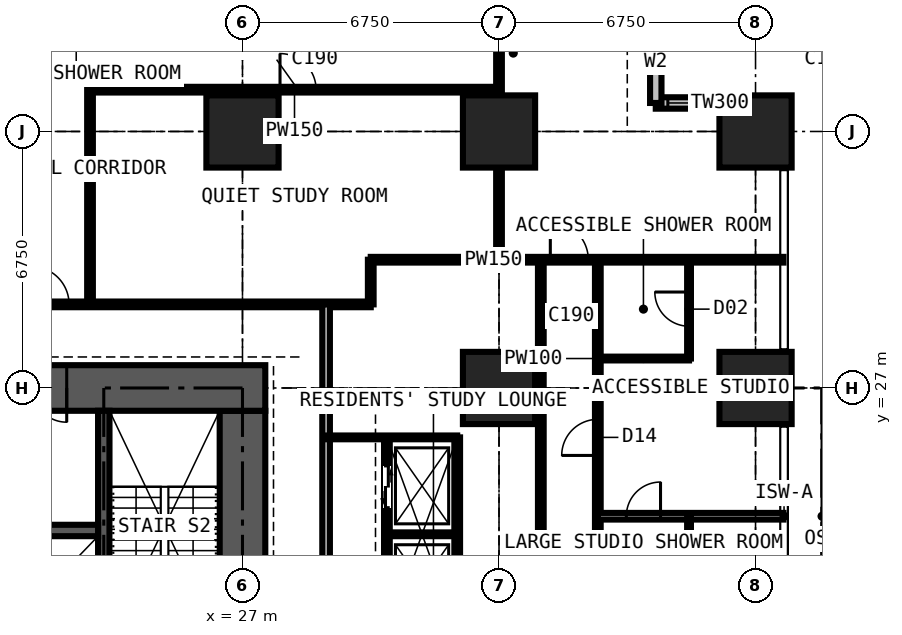
"""IFC4 building model, lengths in metres.
Left out: names, types, materials, properties, quantities, classifications, styles, units other than length and angle.
Written with IfcOpenShell. Run it as: python <this file> out.ifc"""

import sys

from ifc_helpers import new_model, si_unit, direction, frame, frame_2d, origin, origin_2d, place, context, subcontext, project, spatial, rectangle, extrude, element, fill, save


model = new_model("IFC4")
c1 = context("Model", 3, precision=1e-05, world=origin(), true_north=direction((0.0, 1.0)))
c2 = subcontext(c1, "Body", "Model", "MODEL_VIEW")
j1 = project(units=[si_unit("LENGTHUNIT", "METRE"), si_unit("PLANEANGLEUNIT", "RADIAN")], contexts=[c1])
p1 = place(None, origin())
s1 = spatial("IfcSite", under=j1, at=p1, CompositionType="ELEMENT")
p2 = place(p1, origin())
s2 = spatial("IfcBuilding", under=s1, at=p2, CompositionType="ELEMENT")
p3 = place(p2, frame((0.0, 0.0, 18.0)))
s3 = spatial("IfcBuildingStorey", under=s2, at=p3, CompositionType="ELEMENT", Elevation=18.0)
for number, where, z_axis, x_axis in (
    (1, (27.0, 33.75, 0.0), (0.0, 0.0, 1.0), (1.0, 0.0, 0.0)),
    (2, (33.75, 27.0, 0.0), (0.0, 0.0, 1.0), (1.0, 0.0, 0.0)),
    (3, (33.75, 33.75, 0.0), (0.0, 0.0, 1.0), (1.0, 0.0, 0.0)),
    (4, (40.5, 27.0, 0.0), (0.0, 0.0, 1.0), (1.0, 0.0, 0.0)),
    (5, (40.5, 33.75, 0.0), (0.0, 0.0, 1.0), (1.0, 0.0, 0.0)),
):
    element("IfcColumn", number, at=place(p3, frame(where, z_axis=z_axis, x_axis=x_axis)), inside=s3, PredefinedType="COLUMN", context=c2, shape_type="SweptSolid", body=[
        extrude(rectangle(XDim=1.9, YDim=1.9, at=origin_2d()), origin(), (0.0, 0.0, 1.0), 3.6),
    ])
p4 = place(p3, frame((27.0, 14.1, 0.0), z_axis=(0.0, 0.0, 1.0), x_axis=(0.0, 1.0, 0.0)))
e6 = element("IfcWall", 6, at=p4, inside=s3, PredefinedType="SHEAR", context=c2, shape_type="SweptSolid", body=[
    extrude(rectangle(XDim=12.3, YDim=1.2, at=frame_2d((6.15, 0.0))), origin(), (0.0, 0.0, 1.0), 3.6),
])
p5 = place(p4, frame((3.65, 0.0, 0.0)))
e7 = element("IfcOpeningElement", 7, at=p5, cuts=e6, PredefinedType="OPENING", context=c2, shape_type="SweptSolid", body=[
    extrude(rectangle(XDim=1.2, YDim=2.2, at=frame_2d((0.6, 1.1))), frame((0.0, 0.61, 0.0), z_axis=(0.0, -1.0, 0.0), x_axis=(1.0, 0.0, 0.0)), (0.0, 0.0, 1.0), 1.22),
])
p6 = place(p3, frame((27.6, 27.0, 0.0), z_axis=(0.0, 0.0, 1.0), x_axis=(-1.0, 0.0, 0.0)))
e8 = element("IfcWall", 8, at=p6, inside=s3, PredefinedType="SHEAR", context=c2, shape_type="SweptSolid", body=[
    extrude(rectangle(XDim=14.7, YDim=1.2, at=frame_2d((7.35, 0.0))), origin(), (0.0, 0.0, 1.0), 3.6),
])
p7 = place(p6, frame((5.225, 0.0, 0.0)))
e9 = element("IfcOpeningElement", 9, at=p7, cuts=e8, PredefinedType="OPENING", context=c2, shape_type="SweptSolid", body=[
    extrude(rectangle(XDim=0.9, YDim=2.2, at=frame_2d((0.45, 1.1))), frame((0.0, 0.61, 0.0), z_axis=(0.0, -1.0, 0.0), x_axis=(1.0, 0.0, 0.0)), (0.0, 0.0, 1.0), 1.22),
])
p8 = place(p6, frame((8.2, 0.0, 0.0)))
e10 = element("IfcOpeningElement", 10, at=p8, cuts=e8, PredefinedType="OPENING", context=c2, shape_type="SweptSolid", body=[
    extrude(rectangle(XDim=1.0, YDim=2.2, at=frame_2d((0.5, 1.1))), frame((0.0, 0.61, 0.0), z_axis=(0.0, -1.0, 0.0), x_axis=(1.0, 0.0, 0.0)), (0.0, 0.0, 1.0), 1.22),
])
p9 = place(p3, frame((41.25, 34.5, 0.0), z_axis=(0.0, 0.0, 1.0), x_axis=(-1.0, 0.0, 0.0)))
e11 = element("IfcWall", 11, at=p9, inside=s3, PredefinedType="SOLIDWALL", context=c2, shape_type="SweptSolid", body=[
    extrude(rectangle(XDim=3.375, YDim=0.3, at=frame_2d((1.688, 0.0))), origin(), (0.0, 0.0, 1.0), 3.375),
])
p10 = place(p9, frame((1.857, 0.0, 0.9)))
e12 = element("IfcOpeningElement", 12, at=p10, cuts=e11, PredefinedType="OPENING", context=c2, shape_type="SweptSolid", body=[
    extrude(rectangle(XDim=1.2, YDim=1.8, at=frame_2d((0.6, 0.9))), frame((0.0, 0.16, 0.0), z_axis=(0.0, -1.0, 0.0), x_axis=(1.0, 0.0, 0.0)), (0.0, 0.0, 1.0), 0.32),
])
p11 = place(p3, frame((37.875, 34.5, 0.0), z_axis=(0.0, 0.0, 1.0), x_axis=(0.0, 1.0, 0.0)))
e13 = element("IfcWall", 13, at=p11, inside=s3, PredefinedType="SOLIDWALL", context=c2, shape_type="SweptSolid", body=[
    extrude(rectangle(XDim=3.375, YDim=0.3, at=frame_2d((1.688, 0.0))), origin(), (0.0, 0.0, 1.0), 3.375),
])
p12 = place(p11, frame((0.788, 0.0, 0.6)))
e14 = element("IfcOpeningElement", 14, at=p12, cuts=e13, PredefinedType="OPENING", context=c2, shape_type="SweptSolid", body=[
    extrude(rectangle(XDim=1.8, YDim=2.1, at=frame_2d((0.9, 1.05))), frame((0.0, 0.16, 0.0), z_axis=(0.0, -1.0, 0.0), x_axis=(1.0, 0.0, 0.0)), (0.0, 0.0, 1.0), 0.32),
])
p13 = place(p3, frame((23.35, 20.3, 0.0), z_axis=(0.0, 0.0, 1.0), x_axis=(0.0, 1.0, 0.0)))
e15 = element("IfcWall", 15, at=p13, inside=s3, PredefinedType="SHEAR", context=c2, shape_type="SweptSolid", body=[
    extrude(rectangle(XDim=6.1, YDim=0.3, at=frame_2d((3.05, 0.0))), origin(), (0.0, 0.0, 1.0), 3.6),
])
p14 = place(p3, frame((17.3, 23.25, 0.0), z_axis=(0.0, 0.0, 1.0), x_axis=(1.0, 0.0, 0.0)))
e16 = element("IfcWall", 16, at=p14, inside=s3, PredefinedType="SHEAR", context=c2, shape_type="SweptSolid", body=[
    extrude(rectangle(XDim=5.9, YDim=0.3, at=frame_2d((2.95, 0.0))), origin(), (0.0, 0.0, 1.0), 3.6),
])
p15 = place(p3, frame((11.3, 29.2, 0.0), z_axis=(0.0, 0.0, 1.0), x_axis=(1.0, 0.0, 0.0)))
e17 = element("IfcWall", 17, at=p15, inside=s3, PredefinedType="PARTITIONING", context=c2, shape_type="SweptSolid", body=[
    extrude(rectangle(XDim=19.075, YDim=0.15, at=frame_2d((9.538, 0.0))), origin(), (0.0, 0.0, 1.0), 3.375),
])
p16 = place(p15, frame((10.137, 0.0, 0.0)))
e18 = element("IfcOpeningElement", 18, at=p16, cuts=e17, PredefinedType="OPENING", context=c2, shape_type="SweptSolid", body=[
    extrude(rectangle(XDim=1.0, YDim=2.2, at=frame_2d((0.5, 1.1))), frame((0.0, 0.085, 0.0), z_axis=(0.0, -1.0, 0.0), x_axis=(1.0, 0.0, 0.0)), (0.0, 0.0, 1.0), 0.17),
])
p17 = place(p3, frame((22.988, 34.85, 0.0), z_axis=(0.0, 0.0, 1.0), x_axis=(1.0, 0.0, 0.0)))
e19 = element("IfcWall", 19, at=p17, inside=s3, PredefinedType="PARTITIONING", context=c2, shape_type="SweptSolid", body=[
    extrude(rectangle(XDim=10.762, YDim=0.15, at=frame_2d((5.381, 0.0))), origin(), (0.0, 0.0, 1.0), 3.375),
])
p18 = place(p17, frame((5.0, 0.0, 0.0)))
e20 = element("IfcOpeningElement", 20, at=p18, cuts=e19, PredefinedType="OPENING", context=c2, shape_type="SweptSolid", body=[
    extrude(rectangle(XDim=0.95, YDim=2.2, at=frame_2d((0.475, 1.1))), frame((0.0, 0.085, 0.0), z_axis=(0.0, -1.0, 0.0), x_axis=(1.0, 0.0, 0.0)), (0.0, 0.0, 1.0), 0.17),
])
p19 = place(p3, frame((22.988, 29.2, 0.0), z_axis=(0.0, 0.0, 1.0), x_axis=(0.0, 1.0, 0.0)))
e21 = element("IfcWall", 21, at=p19, inside=s3, PredefinedType="PARTITIONING", context=c2, shape_type="SweptSolid", body=[
    extrude(rectangle(XDim=5.65, YDim=0.15, at=frame_2d((2.825, 0.0))), origin(), (0.0, 0.0, 1.0), 3.375),
])
p20 = place(p3, frame((29.2, 11.3, 0.0), z_axis=(0.0, 0.0, 1.0), x_axis=(0.0, 1.0, 0.0)))
e22 = element("IfcWall", 22, at=p20, inside=s3, PredefinedType="PARTITIONING", context=c2, shape_type="SweptSolid", body=[
    extrude(rectangle(XDim=17.9, YDim=0.2, at=frame_2d((8.95, 0.0))), origin(), (0.0, 0.0, 1.0), 3.375),
])
p21 = place(p20, frame((8.35, 0.0, 0.0)))
e23 = element("IfcOpeningElement", 23, at=p21, cuts=e22, PredefinedType="OPENING", context=c2, shape_type="SweptSolid", body=[
    extrude(rectangle(XDim=1.2, YDim=2.2, at=frame_2d((0.6, 1.1))), frame((0.0, 0.11, 0.0), z_axis=(0.0, -1.0, 0.0), x_axis=(1.0, 0.0, 0.0)), (0.0, 0.0, 1.0), 0.22),
])
p22 = place(p3, frame((29.2, 25.7, 0.0), z_axis=(0.0, 0.0, 1.0), x_axis=(1.0, 0.0, 0.0)))
e24 = element("IfcWall", 24, at=p22, inside=s3, PredefinedType="SHEAR", context=c2, shape_type="SweptSolid", body=[
    extrude(rectangle(XDim=3.45, YDim=0.1, at=frame_2d((1.725, 0.0))), origin(), (0.0, 0.0, 1.0), 3.375),
])
p23 = place(p3, frame((30.375, 29.2, 0.0), z_axis=(0.0, 0.0, 1.0), x_axis=(0.0, 1.0, 0.0)))
e25 = element("IfcWall", 25, at=p23, inside=s3, PredefinedType="PARTITIONING", context=c2, shape_type="SweptSolid", body=[
    extrude(rectangle(XDim=1.175, YDim=0.15, at=frame_2d((0.587, 0.0))), origin(), (0.0, 0.0, 1.0), 3.375),
])
p24 = place(p3, frame((30.375, 30.375, 0.0), z_axis=(0.0, 0.0, 1.0), x_axis=(1.0, 0.0, 0.0)))
e26 = element("IfcWall", 26, at=p24, inside=s3, PredefinedType="PARTITIONING", context=c2, shape_type="SweptSolid", body=[
    extrude(rectangle(XDim=10.859, YDim=0.15, at=frame_2d((5.429, 0.0))), origin(), (0.0, 0.0, 1.0), 3.375),
])
p25 = place(p24, frame((4.725, 0.0, 0.0)))
e27 = element("IfcOpeningElement", 27, at=p25, cuts=e26, PredefinedType="OPENING", context=c2, shape_type="SweptSolid", body=[
    extrude(rectangle(XDim=1.0, YDim=2.2, at=frame_2d((0.5, 1.1))), frame((0.0, 0.085, 0.0), z_axis=(0.0, -1.0, 0.0), x_axis=(1.0, 0.0, 0.0)), (0.0, 0.0, 1.0), 0.17),
])
p26 = place(p3, frame((30.8, 14.8, 0.0), z_axis=(0.0, 0.0, 1.0), x_axis=(0.0, 1.0, 0.0)))
e28 = element("IfcWall", 28, at=p26, inside=s3, PredefinedType="PARTITIONING", context=c2, shape_type="SweptSolid", body=[
    extrude(rectangle(XDim=10.9, YDim=0.15, at=frame_2d((5.45, 0.0))), origin(), (0.0, 0.0, 1.0), 3.375),
])
p27 = place(p26, frame((0.75, 0.0, 0.0)))
e29 = element("IfcOpeningElement", 29, at=p27, cuts=e28, PredefinedType="OPENING", context=c2, shape_type="SweptSolid", body=[
    extrude(rectangle(XDim=1.1, YDim=2.2, at=frame_2d((0.55, 1.1))), frame((0.0, 0.085, 0.0), z_axis=(0.0, -1.0, 0.0), x_axis=(1.0, 0.0, 0.0)), (0.0, 0.0, 1.0), 0.17),
])
p28 = place(p26, frame((3.25, 0.0, 0.0)))
e30 = element("IfcOpeningElement", 30, at=p28, cuts=e28, PredefinedType="OPENING", context=c2, shape_type="SweptSolid", body=[
    extrude(rectangle(XDim=1.1, YDim=2.2, at=frame_2d((0.55, 1.1))), frame((0.0, 0.085, 0.0), z_axis=(0.0, -1.0, 0.0), x_axis=(1.0, 0.0, 0.0)), (0.0, 0.0, 1.0), 0.17),
])
p29 = place(p26, frame((6.5, 0.0, 0.0)))
e31 = element("IfcOpeningElement", 31, at=p29, cuts=e28, PredefinedType="OPENING", context=c2, shape_type="SweptSolid", body=[
    extrude(rectangle(XDim=1.1, YDim=2.2, at=frame_2d((0.55, 1.1))), frame((0.0, 0.085, 0.0), z_axis=(0.0, -1.0, 0.0), x_axis=(1.0, 0.0, 0.0)), (0.0, 0.0, 1.0), 0.17),
])
p30 = place(p26, frame((9.05, 0.0, 0.0)))
e32 = element("IfcOpeningElement", 32, at=p30, cuts=e28, PredefinedType="OPENING", context=c2, shape_type="SweptSolid", body=[
    extrude(rectangle(XDim=1.1, YDim=2.2, at=frame_2d((0.55, 1.1))), frame((0.0, 0.085, 0.0), z_axis=(0.0, -1.0, 0.0), x_axis=(1.0, 0.0, 0.0)), (0.0, 0.0, 1.0), 0.17),
])
p31 = place(p3, frame((30.8, 23.15, 0.0), z_axis=(0.0, 0.0, 1.0), x_axis=(1.0, 0.0, 0.0)))
e33 = element("IfcWall", 33, at=p31, inside=s3, PredefinedType="SHEAR", context=c2, shape_type="SweptSolid", body=[
    extrude(rectangle(XDim=1.85, YDim=0.1, at=frame_2d((0.925, 0.0))), origin(), (0.0, 0.0, 1.0), 3.375),
])
p32 = place(p3, frame((32.65, 20.6, 0.0), z_axis=(0.0, 0.0, 1.0), x_axis=(0.0, 1.0, 0.0)))
e34 = element("IfcWall", 34, at=p32, inside=s3, PredefinedType="PARTITIONING", context=c2, shape_type="SweptSolid", body=[
    extrude(rectangle(XDim=5.1, YDim=0.15, at=frame_2d((2.55, 0.0))), origin(), (0.0, 0.0, 1.0), 3.375),
])
p33 = place(p3, frame((33.75, 30.375, 0.0), z_axis=(0.0, 0.0, 1.0), x_axis=(0.0, 1.0, 0.0)))
e35 = element("IfcWall", 35, at=p33, inside=s3, PredefinedType="PARTITIONING", context=c2, shape_type="SweptSolid", body=[
    extrude(rectangle(XDim=5.975, YDim=0.15, at=frame_2d((2.988, 0.0))), origin(), (0.0, 0.0, 1.0), 2.877),
])
p34 = place(p3, frame((34.85, 12.55, 0.0), z_axis=(0.0, 0.0, 1.0), x_axis=(0.0, 1.0, 0.0)))
e36 = element("IfcWall", 36, at=p34, inside=s3, PredefinedType="PARTITIONING", context=c2, shape_type="SweptSolid", body=[
    extrude(rectangle(XDim=17.825, YDim=0.15, at=frame_2d((8.913, 0.0))), origin(), (0.0, 0.0, 1.0), 3.375),
])
p35 = place(p34, frame((8.65, 0.0, 0.0)))
e37 = element("IfcOpeningElement", 37, at=p35, cuts=e36, PredefinedType="OPENING", context=c2, shape_type="SweptSolid", body=[
    extrude(rectangle(XDim=0.95, YDim=2.2, at=frame_2d((0.475, 1.1))), frame((0.0, 0.085, 0.0), z_axis=(0.0, -1.0, 0.0), x_axis=(1.0, 0.0, 0.0)), (0.0, 0.0, 1.0), 0.17),
])
p36 = place(p3, frame((36.35, 6.75, 0.0), z_axis=(0.0, 0.0, 1.0), x_axis=(0.0, 1.0, 0.0)))
e38 = element("IfcWall", 38, at=p36, inside=s3, PredefinedType="PARTITIONING", context=c2, shape_type="SweptSolid", body=[
    extrude(rectangle(XDim=23.625, YDim=0.15, at=frame_2d((11.812, 0.0))), origin(), (0.0, 0.0, 1.0), 3.375),
])
p37 = place(p36, frame((18.475, 0.0, 0.0)))
e39 = element("IfcOpeningElement", 39, at=p37, cuts=e38, PredefinedType="OPENING", context=c2, shape_type="SweptSolid", body=[
    extrude(rectangle(XDim=0.95, YDim=2.2, at=frame_2d((0.475, 1.1))), frame((0.0, 0.085, 0.0), z_axis=(0.0, -1.0, 0.0), x_axis=(1.0, 0.0, 0.0)), (0.0, 0.0, 1.0), 0.17),
])
p38 = place(p36, frame((11.725, 0.0, 0.0)))
e40 = element("IfcOpeningElement", 40, at=p38, cuts=e38, PredefinedType="OPENING", context=c2, shape_type="SweptSolid", body=[
    extrude(rectangle(XDim=0.95, YDim=2.2, at=frame_2d((0.475, 1.1))), frame((0.0, 0.085, 0.0), z_axis=(0.0, -1.0, 0.0), x_axis=(1.0, 0.0, 0.0)), (0.0, 0.0, 1.0), 0.17),
])
p39 = place(p36, frame((6.95, 0.0, 0.0)))
e41 = element("IfcOpeningElement", 41, at=p39, cuts=e38, PredefinedType="OPENING", context=c2, shape_type="SweptSolid", body=[
    extrude(rectangle(XDim=0.95, YDim=2.2, at=frame_2d((0.475, 1.1))), frame((0.0, 0.085, 0.0), z_axis=(0.0, -1.0, 0.0), x_axis=(1.0, 0.0, 0.0)), (0.0, 0.0, 1.0), 0.17),
])
p40 = place(p3, frame((36.35, 23.625, 0.0), z_axis=(0.0, 0.0, 1.0), x_axis=(1.0, 0.0, 0.0)))
e42 = element("IfcWall", 42, at=p40, inside=s3, PredefinedType="PARTITIONING", context=c2, shape_type="SweptSolid", body=[
    extrude(rectangle(XDim=4.884, YDim=0.175, at=frame_2d((2.442, 0.0))), origin(), (0.0, 0.0, 1.0), 3.375),
])
p41 = place(p40, frame((0.75, 0.0, 0.0)))
e43 = element("IfcOpeningElement", 43, at=p41, cuts=e42, PredefinedType="OPENING", context=c2, shape_type="SweptSolid", body=[
    extrude(rectangle(XDim=0.9, YDim=2.2, at=frame_2d((0.45, 1.1))), frame((0.0, 0.097, 0.0), z_axis=(0.0, -1.0, 0.0), x_axis=(1.0, 0.0, 0.0)), (0.0, 0.0, 1.0), 0.195),
])
p42 = place(p3, frame((36.35, 27.775, 0.0), z_axis=(0.0, 0.0, 1.0), x_axis=(1.0, 0.0, 0.0)))
e44 = element("IfcWall", 44, at=p42, inside=s3, PredefinedType="PARTITIONING", context=c2, shape_type="SweptSolid", body=[
    extrude(rectangle(XDim=2.4, YDim=0.1, at=frame_2d((1.2, 0.0))), origin(), (0.0, 0.0, 1.0), 3.375),
])
p43 = place(p3, frame((38.75, 21.025, 0.0), z_axis=(0.0, 0.0, 1.0), x_axis=(0.0, 1.0, 0.0)))
e45 = element("IfcWall", 45, at=p43, inside=s3, PredefinedType="PARTITIONING", context=c2, shape_type="SweptSolid", body=[
    extrude(rectangle(XDim=2.6, YDim=0.1, at=frame_2d((1.3, 0.0))), origin(), (0.0, 0.0, 1.0), 3.375),
])
p44 = place(p3, frame((38.75, 27.775, 0.0), z_axis=(0.0, 0.0, 1.0), x_axis=(0.0, 1.0, 0.0)))
e46 = element("IfcWall", 46, at=p44, inside=s3, PredefinedType="PARTITIONING", context=c2, shape_type="SweptSolid", body=[
    extrude(rectangle(XDim=2.6, YDim=0.1, at=frame_2d((1.3, 0.0))), origin(), (0.0, 0.0, 1.0), 3.375),
])
p45 = place(p44, frame((0.85, 0.0, 0.0)))
e47 = element("IfcOpeningElement", 47, at=p45, cuts=e46, PredefinedType="OPENING", context=c2, shape_type="SweptSolid", body=[
    extrude(rectangle(XDim=0.9, YDim=2.2, at=frame_2d((0.45, 1.1))), frame((0.0, 0.06, 0.0), z_axis=(0.0, -1.0, 0.0), x_axis=(1.0, 0.0, 0.0)), (0.0, 0.0, 1.0), 0.12),
])
p46 = place(p10, origin())
e48 = element("IfcWindow", 48, at=p46, inside=s3, PartitioningType="SINGLE_PANEL", PredefinedType="WINDOW", context=c2, shape_type="SweptSolid", body=[
    extrude(rectangle(XDim=1.2, YDim=1.8, at=frame_2d((0.6, 0.9))), frame((0.0, 0.03, 0.0), z_axis=(0.0, -1.0, 0.0), x_axis=(1.0, 0.0, 0.0)), (0.0, 0.0, 1.0), 0.06),
])
fill(e12, e48)
p47 = place(p12, origin())
e49 = element("IfcWindow", 49, at=p47, inside=s3, PartitioningType="SINGLE_PANEL", PredefinedType="WINDOW", context=c2, shape_type="SweptSolid", body=[
    extrude(rectangle(XDim=1.8, YDim=2.1, at=frame_2d((0.9, 1.05))), frame((0.0, 0.03, 0.0), z_axis=(0.0, -1.0, 0.0), x_axis=(1.0, 0.0, 0.0)), (0.0, 0.0, 1.0), 0.06),
])
fill(e14, e49)
p48 = place(p7, origin())
e50 = element("IfcDoor", 50, at=p48, inside=s3, OperationType="SINGLE_SWING_LEFT", PredefinedType="DOOR", context=c2, shape_type="SweptSolid", body=[
    extrude(rectangle(XDim=0.9, YDim=2.2, at=frame_2d((0.45, 1.1))), frame((0.0, 0.4, 0.0), z_axis=(0.0, -1.0, 0.0), x_axis=(1.0, 0.0, 0.0)), (0.0, 0.0, 1.0), 0.8),
])
fill(e9, e50)
p49 = place(p37, origin())
e51 = element("IfcDoor", 51, at=p49, inside=s3, OperationType="SINGLE_SWING_LEFT", PredefinedType="DOOR", context=c2, shape_type="SweptSolid", body=[
    extrude(rectangle(XDim=0.95, YDim=2.2, at=frame_2d((0.475, 1.1))), frame((0.0, 0.025, 0.0), z_axis=(0.0, -1.0, 0.0), x_axis=(1.0, 0.0, 0.0)), (0.0, 0.0, 1.0), 0.05),
])
fill(e39, e51)
p50 = place(p45, origin())
e52 = element("IfcDoor", 52, at=p50, inside=s3, OperationType="SINGLE_SWING_RIGHT", PredefinedType="DOOR", context=c2, shape_type="SweptSolid", body=[
    extrude(rectangle(XDim=0.9, YDim=2.2, at=frame_2d((0.45, 1.1))), frame((0.0, 0.025, 0.0), z_axis=(0.0, -1.0, 0.0), x_axis=(1.0, 0.0, 0.0)), (0.0, 0.0, 1.0), 0.05),
])
fill(e47, e52)
p51 = place(p41, origin())
e53 = element("IfcDoor", 53, at=p51, inside=s3, OperationType="SINGLE_SWING_RIGHT", PredefinedType="DOOR", context=c2, shape_type="SweptSolid", body=[
    extrude(rectangle(XDim=0.9, YDim=2.2, at=frame_2d((0.45, 1.1))), frame((0.0, 0.025, 0.0), z_axis=(0.0, -1.0, 0.0), x_axis=(1.0, 0.0, 0.0)), (0.0, 0.0, 1.0), 0.05),
])
fill(e43, e53)
p52 = place(p25, origin())
e54 = element("IfcDoor", 54, at=p52, inside=s3, OperationType="SINGLE_SWING_LEFT", PredefinedType="DOOR", context=c2, shape_type="SweptSolid", body=[
    extrude(rectangle(XDim=1.0, YDim=2.2, at=frame_2d((0.5, 1.1))), frame((0.0, 0.025, 0.0), z_axis=(0.0, -1.0, 0.0), x_axis=(1.0, 0.0, 0.0)), (0.0, 0.0, 1.0), 0.05),
])
fill(e27, e54)
p53 = place(p16, origin())
e55 = element("IfcDoor", 55, at=p53, inside=s3, OperationType="SINGLE_SWING_LEFT", PredefinedType="DOOR", context=c2, shape_type="SweptSolid", body=[
    extrude(rectangle(XDim=1.0, YDim=2.2, at=frame_2d((0.5, 1.1))), frame((0.0, 0.025, 0.0), z_axis=(0.0, -1.0, 0.0), x_axis=(1.0, 0.0, 0.0)), (0.0, 0.0, 1.0), 0.05),
])
fill(e18, e55)
p54 = place(p18, origin())
e56 = element("IfcDoor", 56, at=p54, inside=s3, OperationType="SINGLE_SWING_LEFT", PredefinedType="DOOR", context=c2, shape_type="SweptSolid", body=[
    extrude(rectangle(XDim=0.95, YDim=2.2, at=frame_2d((0.475, 1.1))), frame((0.0, 0.025, 0.0), z_axis=(0.0, -1.0, 0.0), x_axis=(1.0, 0.0, 0.0)), (0.0, 0.0, 1.0), 0.05),
])
fill(e20, e56)
p55 = place(p30, origin())
e57 = element("IfcDoor", 57, at=p55, inside=s3, OperationType="DOUBLE_DOOR_SLIDING", PredefinedType="DOOR", context=c2, shape_type="SweptSolid", body=[
    extrude(rectangle(XDim=1.1, YDim=2.2, at=frame_2d((0.55, 1.1))), frame((0.0, 0.025, 0.0), z_axis=(0.0, -1.0, 0.0), x_axis=(1.0, 0.0, 0.0)), (0.0, 0.0, 1.0), 0.05),
])
fill(e32, e57)
save(model, sys.argv[1])
